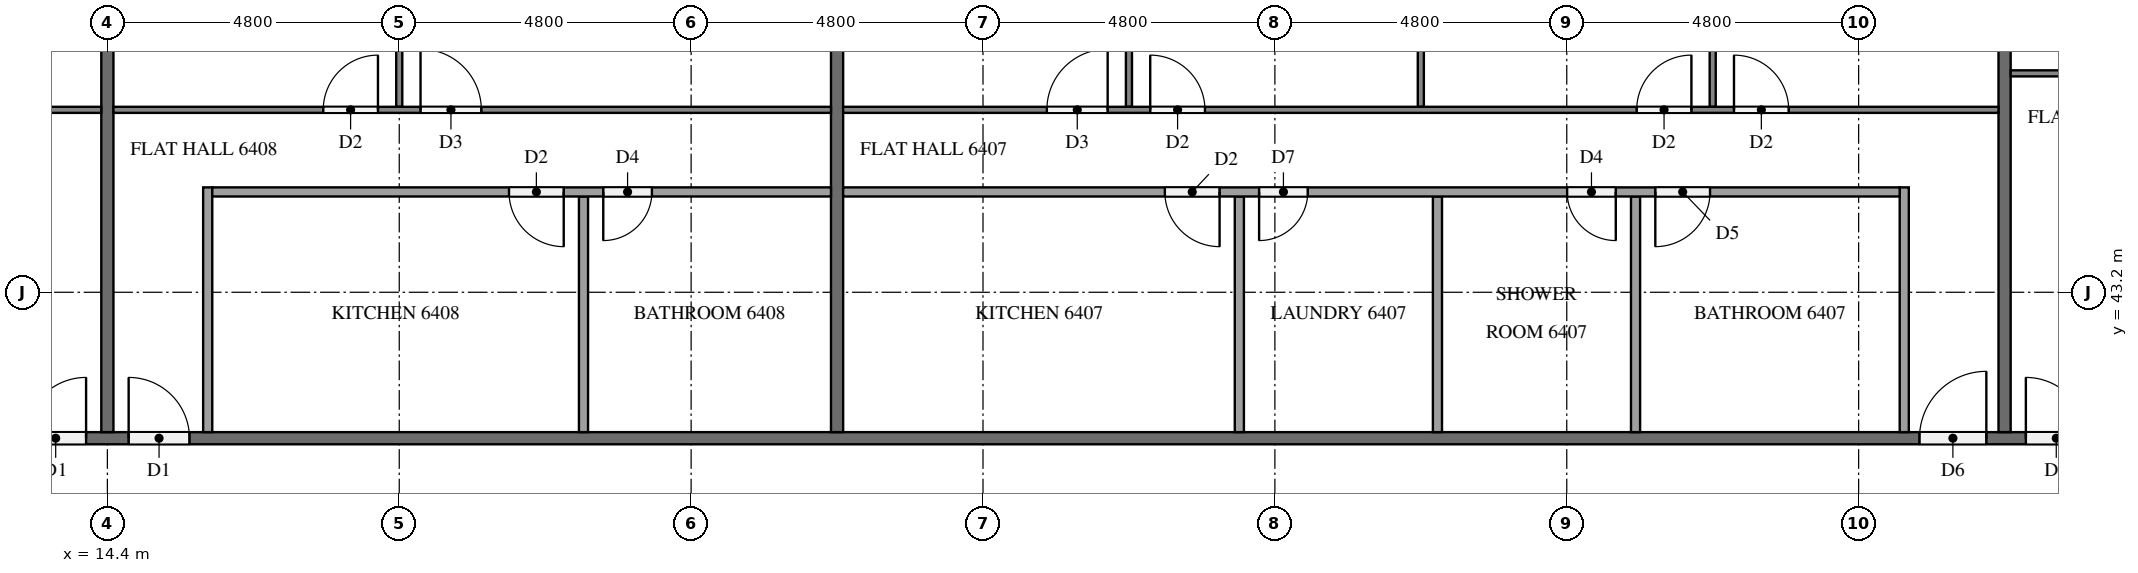
"""IFC4 building model, lengths in metres.
Left out: names, types, materials, properties, quantities, classifications, styles, units other than length and angle.
Written with IfcOpenShell. Run it as: python <this file> out.ifc"""

import sys

from ifc_helpers import new_model, si_unit, direction, frame, frame_2d, origin, place, context, subcontext, project, spatial, rectangle, extrude, element, fill, save


model = new_model("IFC4")
c1 = context("Model", 3, precision=1e-05, world=origin(), true_north=direction((0.0, 1.0)))
c2 = subcontext(c1, "Body", "Model", "MODEL_VIEW")
j1 = project(units=[si_unit("LENGTHUNIT", "METRE"), si_unit("PLANEANGLEUNIT", "RADIAN")], contexts=[c1])
p1 = place(None, origin())
s1 = spatial("IfcSite", under=j1, at=p1, CompositionType="ELEMENT")
p2 = place(p1, origin())
s2 = spatial("IfcBuilding", under=s1, at=p2, CompositionType="ELEMENT")
p3 = place(p2, frame((0.0, 0.0, 245.7)))
s3 = spatial("IfcBuildingStorey", under=s2, at=p3, CompositionType="ELEMENT", Elevation=245.7)
p4 = place(p3, frame((11.9, 40.8, 0.0), z_axis=(0.0, 0.0, 1.0), x_axis=(1.0, 0.0, 0.0)))
e1 = element("IfcWall", 1, at=p4, inside=s3, PredefinedType="PARTITIONING", context=c2, shape_type="SweptSolid", body=[
    extrude(rectangle(XDim=38.6, YDim=0.2, at=frame_2d((19.3, 0.0))), origin(), (0.0, 0.0, 1.0), 3.2),
])
p5 = place(p4, frame((34.05, 0.0, 0.0)))
e2 = element("IfcOpeningElement", 2, at=p5, cuts=e1, PredefinedType="OPENING", context=c2, shape_type="SweptSolid", body=[
    extrude(rectangle(XDim=1.0, YDim=2.1, at=frame_2d((0.5, 1.05))), frame((0.0, 0.11, 0.0), z_axis=(0.0, -1.0, 0.0), x_axis=(1.0, 0.0, 0.0)), (0.0, 0.0, 1.0), 0.22),
])
p6 = place(p4, frame((32.3, 0.0, 0.0)))
e3 = element("IfcOpeningElement", 3, at=p6, cuts=e1, PredefinedType="OPENING", context=c2, shape_type="SweptSolid", body=[
    extrude(rectangle(XDim=1.1, YDim=2.1, at=frame_2d((0.55, 1.05))), frame((0.0, 0.11, 0.0), z_axis=(0.0, -1.0, 0.0), x_axis=(1.0, 0.0, 0.0)), (0.0, 0.0, 1.0), 0.22),
])
p7 = place(p4, frame((2.85, 0.0, 0.0)))
e4 = element("IfcOpeningElement", 4, at=p7, cuts=e1, PredefinedType="OPENING", context=c2, shape_type="SweptSolid", body=[
    extrude(rectangle(XDim=1.0, YDim=2.1, at=frame_2d((0.5, 1.05))), frame((0.0, 0.11, 0.0), z_axis=(0.0, -1.0, 0.0), x_axis=(1.0, 0.0, 0.0)), (0.0, 0.0, 1.0), 0.22),
])
p8 = place(p4, frame((1.15, 0.0, 0.0)))
e5 = element("IfcOpeningElement", 5, at=p8, cuts=e1, PredefinedType="OPENING", context=c2, shape_type="SweptSolid", body=[
    extrude(rectangle(XDim=1.0, YDim=2.1, at=frame_2d((0.5, 1.05))), frame((0.0, 0.11, 0.0), z_axis=(0.0, -1.0, 0.0), x_axis=(1.0, 0.0, 0.0)), (0.0, 0.0, 1.0), 0.22),
])
for number, where, z_axis, x_axis in (
    (6, (45.6, 52.7, 0.0), (0.0, 0.0, 1.0), (0.0, -1.0, 0.0)),
    (7, (26.4, 52.7, 0.0), (0.0, 0.0, 1.0), (0.0, -1.0, 0.0)),
):
    element("IfcWall", number, at=place(p3, frame(where, z_axis=z_axis, x_axis=x_axis)), inside=s3, PredefinedType="PARTITIONING", context=c2, shape_type="SweptSolid", body=[
        extrude(rectangle(XDim=11.8, YDim=0.2, at=frame_2d((5.9, 0.0))), origin(), (0.0, 0.0, 1.0), 3.2),
    ])
p9 = place(p3, frame((14.4, 52.525, 0.0), z_axis=(0.0, 0.0, 1.0), x_axis=(0.0, -1.0, 0.0)))
e8 = element("IfcWall", 8, at=p9, inside=s3, PredefinedType="PARTITIONING", context=c2, shape_type="SweptSolid", body=[
    extrude(rectangle(XDim=11.625, YDim=0.2, at=frame_2d((5.812, 0.0))), origin(), (0.0, 0.0, 1.0), 3.2),
])
p10 = place(p3, frame((45.7, 46.8, 0.0), z_axis=(0.0, 0.0, 1.0), x_axis=(1.0, 0.0, 0.0)))
e9 = element("IfcWall", 9, at=p10, inside=s3, PredefinedType="PARTITIONING", context=c2, shape_type="SweptSolid", body=[
    extrude(rectangle(XDim=11.8, YDim=0.1, at=frame_2d((5.9, 0.0))), origin(), (0.0, 0.0, 1.0), 3.2),
])
p11 = place(p10, frame((3.45, 0.0, 0.0)))
e10 = element("IfcOpeningElement", 10, at=p11, cuts=e9, PredefinedType="OPENING", context=c2, shape_type="SweptSolid", body=[
    extrude(rectangle(XDim=0.9, YDim=2.1, at=frame_2d((0.45, 1.05))), frame((0.0, 0.06, 0.0), z_axis=(0.0, -1.0, 0.0), x_axis=(1.0, 0.0, 0.0)), (0.0, 0.0, 1.0), 0.12),
])
p12 = place(p10, frame((5.05, 0.0, 0.0)))
e11 = element("IfcOpeningElement", 11, at=p12, cuts=e9, PredefinedType="OPENING", context=c2, shape_type="SweptSolid", body=[
    extrude(rectangle(XDim=1.0, YDim=2.1, at=frame_2d((0.5, 1.05))), frame((0.0, 0.06, 0.0), z_axis=(0.0, -1.0, 0.0), x_axis=(1.0, 0.0, 0.0)), (0.0, 0.0, 1.0), 0.12),
])
for number, where, z_axis, x_axis in (
    (12, (40.8, 46.25, 0.0), (0.0, 0.0, 1.0), (0.0, 1.0, 0.0)),
    (13, (36.0, 46.25, 0.0), (0.0, 0.0, 1.0), (0.0, 1.0, 0.0)),
    (14, (31.2, 46.25, 0.0), (0.0, 0.0, 1.0), (0.0, 1.0, 0.0)),
):
    element("IfcWall", number, at=place(p3, frame(where, z_axis=z_axis, x_axis=x_axis)), inside=s3, PredefinedType="PARTITIONING", context=c2, shape_type="SweptSolid", body=[
        extrude(rectangle(XDim=6.45, YDim=0.1, at=frame_2d((3.225, 0.0))), origin(), (0.0, 0.0, 1.0), 3.2),
    ])
p13 = place(p3, frame((26.5, 46.2, 0.0), z_axis=(0.0, 0.0, 1.0), x_axis=(1.0, 0.0, 0.0)))
e15 = element("IfcWall", 15, at=p13, inside=s3, PredefinedType="PARTITIONING", context=c2, shape_type="SweptSolid", body=[
    extrude(rectangle(XDim=19.0, YDim=0.1, at=frame_2d((9.5, 0.0))), origin(), (0.0, 0.0, 1.0), 3.2),
])
p14 = place(p13, frame((14.65, 0.0, 0.0)))
e16 = element("IfcOpeningElement", 16, at=p14, cuts=e15, PredefinedType="OPENING", context=c2, shape_type="SweptSolid", body=[
    extrude(rectangle(XDim=0.9, YDim=2.1, at=frame_2d((0.45, 1.05))), frame((0.0, 0.06, 0.0), z_axis=(0.0, -1.0, 0.0), x_axis=(1.0, 0.0, 0.0)), (0.0, 0.0, 1.0), 0.12),
])
p15 = place(p13, frame((13.05, 0.0, 0.0)))
e17 = element("IfcOpeningElement", 17, at=p15, cuts=e15, PredefinedType="OPENING", context=c2, shape_type="SweptSolid", body=[
    extrude(rectangle(XDim=0.9, YDim=2.1, at=frame_2d((0.45, 1.05))), frame((0.0, 0.06, 0.0), z_axis=(0.0, -1.0, 0.0), x_axis=(1.0, 0.0, 0.0)), (0.0, 0.0, 1.0), 0.12),
])
p16 = place(p13, frame((5.05, 0.0, 0.0)))
e18 = element("IfcOpeningElement", 18, at=p16, cuts=e15, PredefinedType="OPENING", context=c2, shape_type="SweptSolid", body=[
    extrude(rectangle(XDim=0.9, YDim=2.1, at=frame_2d((0.45, 1.05))), frame((0.0, 0.06, 0.0), z_axis=(0.0, -1.0, 0.0), x_axis=(1.0, 0.0, 0.0)), (0.0, 0.0, 1.0), 0.12),
])
p17 = place(p13, frame((3.35, 0.0, 0.0)))
e19 = element("IfcOpeningElement", 19, at=p17, cuts=e15, PredefinedType="OPENING", context=c2, shape_type="SweptSolid", body=[
    extrude(rectangle(XDim=1.0, YDim=2.1, at=frame_2d((0.5, 1.05))), frame((0.0, 0.06, 0.0), z_axis=(0.0, -1.0, 0.0), x_axis=(1.0, 0.0, 0.0)), (0.0, 0.0, 1.0), 0.12),
])
for number, where, z_axis, x_axis in (
    (20, (39.531, 40.9, 0.0), (0.0, 0.0, 1.0), (0.0, 1.0, 0.0)),
    (21, (36.273, 40.9, 0.0), (0.0, 0.0, 1.0), (0.0, 1.0, 0.0)),
    (22, (33.016, 40.9, 0.0), (0.0, 0.0, 1.0), (0.0, 1.0, 0.0)),
):
    element("IfcWall", number, at=place(p3, frame(where, z_axis=z_axis, x_axis=x_axis)), inside=s3, PredefinedType="PARTITIONING", context=c2, shape_type="SweptSolid", body=[
        extrude(rectangle(XDim=3.875, YDim=0.15, at=frame_2d((1.938, 0.0))), origin(), (0.0, 0.0, 1.0), 3.2),
    ])
p18 = place(p3, frame((43.95, 40.9, 0.0), z_axis=(0.0, 0.0, 1.0), x_axis=(0.0, 1.0, 0.0)))
e23 = element("IfcWall", 23, at=p18, inside=s3, PredefinedType="PARTITIONING", context=c2, shape_type="SweptSolid", body=[
    extrude(rectangle(XDim=4.025, YDim=0.15, at=frame_2d((2.013, 0.0))), origin(), (0.0, 0.0, 1.0), 3.2),
])
p19 = place(p3, frame((43.875, 44.85, 0.0), z_axis=(0.0, 0.0, 1.0), x_axis=(-1.0, 0.0, 0.0)))
e24 = element("IfcWall", 24, at=p19, inside=s3, PredefinedType="PARTITIONING", context=c2, shape_type="SweptSolid", body=[
    extrude(rectangle(XDim=17.375, YDim=0.15, at=frame_2d((8.688, 0.0))), origin(), (0.0, 0.0, 1.0), 3.2),
])
p20 = place(p19, frame((3.119, 0.0, 0.0)))
e25 = element("IfcOpeningElement", 25, at=p20, cuts=e24, PredefinedType="OPENING", context=c2, shape_type="SweptSolid", body=[
    extrude(rectangle(XDim=0.9, YDim=2.1, at=frame_2d((0.45, 1.05))), frame((0.0, 0.085, 0.0), z_axis=(0.0, -1.0, 0.0), x_axis=(1.0, 0.0, 0.0)), (0.0, 0.0, 1.0), 0.17),
])
p21 = place(p19, frame((4.669, 0.0, 0.0)))
e26 = element("IfcOpeningElement", 26, at=p21, cuts=e24, PredefinedType="OPENING", context=c2, shape_type="SweptSolid", body=[
    extrude(rectangle(XDim=0.8, YDim=2.1, at=frame_2d((0.4, 1.05))), frame((0.0, 0.085, 0.0), z_axis=(0.0, -1.0, 0.0), x_axis=(1.0, 0.0, 0.0)), (0.0, 0.0, 1.0), 0.17),
])
p22 = place(p19, frame((9.734, 0.0, 0.0)))
e27 = element("IfcOpeningElement", 27, at=p22, cuts=e24, PredefinedType="OPENING", context=c2, shape_type="SweptSolid", body=[
    extrude(rectangle(XDim=0.8, YDim=2.1, at=frame_2d((0.4, 1.05))), frame((0.0, 0.085, 0.0), z_axis=(0.0, -1.0, 0.0), x_axis=(1.0, 0.0, 0.0)), (0.0, 0.0, 1.0), 0.17),
])
p23 = place(p19, frame((11.184, 0.0, 0.0)))
e28 = element("IfcOpeningElement", 28, at=p23, cuts=e24, PredefinedType="OPENING", context=c2, shape_type="SweptSolid", body=[
    extrude(rectangle(XDim=0.9, YDim=2.1, at=frame_2d((0.45, 1.05))), frame((0.0, 0.085, 0.0), z_axis=(0.0, -1.0, 0.0), x_axis=(1.0, 0.0, 0.0)), (0.0, 0.0, 1.0), 0.17),
])
p24 = place(p3, frame((19.2, 46.25, 0.0), z_axis=(0.0, 0.0, 1.0), x_axis=(0.0, 1.0, 0.0)))
e29 = element("IfcWall", 29, at=p24, inside=s3, PredefinedType="PARTITIONING", context=c2, shape_type="SweptSolid", body=[
    extrude(rectangle(XDim=6.45, YDim=0.1, at=frame_2d((3.225, 0.0))), origin(), (0.0, 0.0, 1.0), 3.2),
])
p25 = place(p3, frame((14.5, 46.2, 0.0), z_axis=(0.0, 0.0, 1.0), x_axis=(1.0, 0.0, 0.0)))
e30 = element("IfcWall", 30, at=p25, inside=s3, PredefinedType="PARTITIONING", context=c2, shape_type="SweptSolid", body=[
    extrude(rectangle(XDim=11.8, YDim=0.1, at=frame_2d((5.9, 0.0))), origin(), (0.0, 0.0, 1.0), 3.2),
])
p26 = place(p25, frame((3.45, 0.0, 0.0)))
e31 = element("IfcOpeningElement", 31, at=p26, cuts=e30, PredefinedType="OPENING", context=c2, shape_type="SweptSolid", body=[
    extrude(rectangle(XDim=0.9, YDim=2.1, at=frame_2d((0.45, 1.05))), frame((0.0, 0.06, 0.0), z_axis=(0.0, -1.0, 0.0), x_axis=(1.0, 0.0, 0.0)), (0.0, 0.0, 1.0), 0.12),
])
p27 = place(p25, frame((5.05, 0.0, 0.0)))
e32 = element("IfcOpeningElement", 32, at=p27, cuts=e30, PredefinedType="OPENING", context=c2, shape_type="SweptSolid", body=[
    extrude(rectangle(XDim=1.0, YDim=2.1, at=frame_2d((0.5, 1.05))), frame((0.0, 0.06, 0.0), z_axis=(0.0, -1.0, 0.0), x_axis=(1.0, 0.0, 0.0)), (0.0, 0.0, 1.0), 0.12),
])
p28 = place(p3, frame((22.23, 40.9, 0.0), z_axis=(0.0, 0.0, 1.0), x_axis=(0.0, 1.0, 0.0)))
e33 = element("IfcWall", 33, at=p28, inside=s3, PredefinedType="PARTITIONING", context=c2, shape_type="SweptSolid", body=[
    extrude(rectangle(XDim=3.875, YDim=0.15, at=frame_2d((1.938, 0.0))), origin(), (0.0, 0.0, 1.0), 3.2),
])
p29 = place(p3, frame((16.05, 40.9, 0.0), z_axis=(0.0, 0.0, 1.0), x_axis=(0.0, 1.0, 0.0)))
e34 = element("IfcWall", 34, at=p29, inside=s3, PredefinedType="PARTITIONING", context=c2, shape_type="SweptSolid", body=[
    extrude(rectangle(XDim=4.025, YDim=0.15, at=frame_2d((2.013, 0.0))), origin(), (0.0, 0.0, 1.0), 3.2),
])
p30 = place(p3, frame((26.3, 44.85, 0.0), z_axis=(0.0, 0.0, 1.0), x_axis=(-1.0, 0.0, 0.0)))
e35 = element("IfcWall", 35, at=p30, inside=s3, PredefinedType="PARTITIONING", context=c2, shape_type="SweptSolid", body=[
    extrude(rectangle(XDim=10.175, YDim=0.15, at=frame_2d((5.087, 0.0))), origin(), (0.0, 0.0, 1.0), 3.2),
])
p31 = place(p30, frame((4.395, 0.0, 0.0)))
e36 = element("IfcOpeningElement", 36, at=p31, cuts=e35, PredefinedType="OPENING", context=c2, shape_type="SweptSolid", body=[
    extrude(rectangle(XDim=0.9, YDim=2.1, at=frame_2d((0.45, 1.05))), frame((0.0, 0.085, 0.0), z_axis=(0.0, -1.0, 0.0), x_axis=(1.0, 0.0, 0.0)), (0.0, 0.0, 1.0), 0.17),
])
p32 = place(p30, frame((2.945, 0.0, 0.0)))
e37 = element("IfcOpeningElement", 37, at=p32, cuts=e35, PredefinedType="OPENING", context=c2, shape_type="SweptSolid", body=[
    extrude(rectangle(XDim=0.8, YDim=2.1, at=frame_2d((0.4, 1.05))), frame((0.0, 0.085, 0.0), z_axis=(0.0, -1.0, 0.0), x_axis=(1.0, 0.0, 0.0)), (0.0, 0.0, 1.0), 0.17),
])
p33 = place(p3, frame((0.1, 46.2, 0.0), z_axis=(0.0, 0.0, 1.0), x_axis=(1.0, 0.0, 0.0)))
e38 = element("IfcWall", 38, at=p33, inside=s3, PredefinedType="PARTITIONING", context=c2, shape_type="SweptSolid", body=[
    extrude(rectangle(XDim=14.2, YDim=0.1, at=frame_2d((7.1, 0.0))), origin(), (0.0, 0.0, 1.0), 3.2),
])
p34 = place(p33, frame((9.85, 0.0, 0.0)))
e39 = element("IfcOpeningElement", 39, at=p34, cuts=e38, PredefinedType="OPENING", context=c2, shape_type="SweptSolid", body=[
    extrude(rectangle(XDim=1.0, YDim=2.1, at=frame_2d((0.5, 1.05))), frame((0.0, 0.06, 0.0), z_axis=(0.0, -1.0, 0.0), x_axis=(1.0, 0.0, 0.0)), (0.0, 0.0, 1.0), 0.12),
])
p35 = place(p33, frame((8.25, 0.0, 0.0)))
e40 = element("IfcOpeningElement", 40, at=p35, cuts=e38, PredefinedType="OPENING", context=c2, shape_type="SweptSolid", body=[
    extrude(rectangle(XDim=0.9, YDim=2.1, at=frame_2d((0.45, 1.05))), frame((0.0, 0.06, 0.0), z_axis=(0.0, -1.0, 0.0), x_axis=(1.0, 0.0, 0.0)), (0.0, 0.0, 1.0), 0.12),
])
p36 = place(p33, frame((0.3, 0.0, 0.0)))
e41 = element("IfcOpeningElement", 41, at=p36, cuts=e38, PredefinedType="OPENING", context=c2, shape_type="SweptSolid", body=[
    extrude(rectangle(XDim=0.9, YDim=2.1, at=frame_2d((0.45, 1.05))), frame((0.0, 0.06, 0.0), z_axis=(0.0, -1.0, 0.0), x_axis=(1.0, 0.0, 0.0)), (0.0, 0.0, 1.0), 0.12),
])
p37 = place(p5, origin())
e42 = element("IfcDoor", 42, at=p37, inside=s3, OperationType="SINGLE_SWING_LEFT", PredefinedType="DOOR", context=c2, shape_type="SweptSolid", body=[
    extrude(rectangle(XDim=1.0, YDim=2.1, at=frame_2d((0.5, 1.05))), frame((0.0, 0.025, 0.0), z_axis=(0.0, -1.0, 0.0), x_axis=(1.0, 0.0, 0.0)), (0.0, 0.0, 1.0), 0.05),
])
fill(e2, e42)
p38 = place(p6, origin())
e43 = element("IfcDoor", 43, at=p38, inside=s3, OperationType="SINGLE_SWING_RIGHT", PredefinedType="DOOR", context=c2, shape_type="SweptSolid", body=[
    extrude(rectangle(XDim=1.1, YDim=2.1, at=frame_2d((0.55, 1.05))), frame((0.0, 0.025, 0.0), z_axis=(0.0, -1.0, 0.0), x_axis=(1.0, 0.0, 0.0)), (0.0, 0.0, 1.0), 0.05),
])
fill(e3, e43)
p39 = place(p7, origin())
e44 = element("IfcDoor", 44, at=p39, inside=s3, OperationType="SINGLE_SWING_LEFT", PredefinedType="DOOR", context=c2, shape_type="SweptSolid", body=[
    extrude(rectangle(XDim=1.0, YDim=2.1, at=frame_2d((0.5, 1.05))), frame((0.0, 0.025, 0.0), z_axis=(0.0, -1.0, 0.0), x_axis=(1.0, 0.0, 0.0)), (0.0, 0.0, 1.0), 0.05),
])
fill(e4, e44)
p40 = place(p8, origin())
e45 = element("IfcDoor", 45, at=p40, inside=s3, OperationType="SINGLE_SWING_RIGHT", PredefinedType="DOOR", context=c2, shape_type="SweptSolid", body=[
    extrude(rectangle(XDim=1.0, YDim=2.1, at=frame_2d((0.5, 1.05))), frame((0.0, 0.025, 0.0), z_axis=(0.0, -1.0, 0.0), x_axis=(1.0, 0.0, 0.0)), (0.0, 0.0, 1.0), 0.05),
])
fill(e5, e45)
p41 = place(p14, origin())
e46 = element("IfcDoor", 46, at=p41, inside=s3, OperationType="SINGLE_SWING_LEFT", PredefinedType="DOOR", context=c2, shape_type="SweptSolid", body=[
    extrude(rectangle(XDim=0.9, YDim=2.1, at=frame_2d((0.45, 1.05))), frame((0.0, 0.025, 0.0), z_axis=(0.0, -1.0, 0.0), x_axis=(1.0, 0.0, 0.0)), (0.0, 0.0, 1.0), 0.05),
])
fill(e16, e46)
p42 = place(p15, origin())
e47 = element("IfcDoor", 47, at=p42, inside=s3, OperationType="SINGLE_SWING_RIGHT", PredefinedType="DOOR", context=c2, shape_type="SweptSolid", body=[
    extrude(rectangle(XDim=0.9, YDim=2.1, at=frame_2d((0.45, 1.05))), frame((0.0, 0.025, 0.0), z_axis=(0.0, -1.0, 0.0), x_axis=(1.0, 0.0, 0.0)), (0.0, 0.0, 1.0), 0.05),
])
fill(e17, e47)
p43 = place(p16, origin())
e48 = element("IfcDoor", 48, at=p43, inside=s3, OperationType="SINGLE_SWING_LEFT", PredefinedType="DOOR", context=c2, shape_type="SweptSolid", body=[
    extrude(rectangle(XDim=0.9, YDim=2.1, at=frame_2d((0.45, 1.05))), frame((0.0, 0.025, 0.0), z_axis=(0.0, -1.0, 0.0), x_axis=(1.0, 0.0, 0.0)), (0.0, 0.0, 1.0), 0.05),
])
fill(e18, e48)
p44 = place(p17, origin())
e49 = element("IfcDoor", 49, at=p44, inside=s3, OperationType="SINGLE_SWING_RIGHT", PredefinedType="DOOR", context=c2, shape_type="SweptSolid", body=[
    extrude(rectangle(XDim=1.0, YDim=2.1, at=frame_2d((0.5, 1.05))), frame((0.0, 0.025, 0.0), z_axis=(0.0, -1.0, 0.0), x_axis=(1.0, 0.0, 0.0)), (0.0, 0.0, 1.0), 0.05),
])
fill(e19, e49)
p45 = place(p20, origin())
e50 = element("IfcDoor", 50, at=p45, inside=s3, OperationType="SINGLE_SWING_RIGHT", PredefinedType="DOOR", context=c2, shape_type="SweptSolid", body=[
    extrude(rectangle(XDim=0.9, YDim=2.1, at=frame_2d((0.45, 1.05))), frame((0.0, 0.025, 0.0), z_axis=(0.0, -1.0, 0.0), x_axis=(1.0, 0.0, 0.0)), (0.0, 0.0, 1.0), 0.05),
])
fill(e25, e50)
p46 = place(p21, origin())
e51 = element("IfcDoor", 51, at=p46, inside=s3, OperationType="SINGLE_SWING_LEFT", PredefinedType="DOOR", context=c2, shape_type="SweptSolid", body=[
    extrude(rectangle(XDim=0.8, YDim=2.1, at=frame_2d((0.4, 1.05))), frame((0.0, 0.025, 0.0), z_axis=(0.0, -1.0, 0.0), x_axis=(1.0, 0.0, 0.0)), (0.0, 0.0, 1.0), 0.05),
])
fill(e26, e51)
p47 = place(p22, origin())
e52 = element("IfcDoor", 52, at=p47, inside=s3, OperationType="SINGLE_SWING_RIGHT", PredefinedType="DOOR", context=c2, shape_type="SweptSolid", body=[
    extrude(rectangle(XDim=0.8, YDim=2.1, at=frame_2d((0.4, 1.05))), frame((0.0, 0.025, 0.0), z_axis=(0.0, -1.0, 0.0), x_axis=(1.0, 0.0, 0.0)), (0.0, 0.0, 1.0), 0.05),
])
fill(e27, e52)
p48 = place(p23, origin())
e53 = element("IfcDoor", 53, at=p48, inside=s3, OperationType="SINGLE_SWING_LEFT", PredefinedType="DOOR", context=c2, shape_type="SweptSolid", body=[
    extrude(rectangle(XDim=0.9, YDim=2.1, at=frame_2d((0.45, 1.05))), frame((0.0, 0.025, 0.0), z_axis=(0.0, -1.0, 0.0), x_axis=(1.0, 0.0, 0.0)), (0.0, 0.0, 1.0), 0.05),
])
fill(e28, e53)
p49 = place(p26, origin())
e54 = element("IfcDoor", 54, at=p49, inside=s3, OperationType="SINGLE_SWING_RIGHT", PredefinedType="DOOR", context=c2, shape_type="SweptSolid", body=[
    extrude(rectangle(XDim=0.9, YDim=2.1, at=frame_2d((0.45, 1.05))), frame((0.0, 0.025, 0.0), z_axis=(0.0, -1.0, 0.0), x_axis=(1.0, 0.0, 0.0)), (0.0, 0.0, 1.0), 0.05),
])
fill(e31, e54)
p50 = place(p27, origin())
e55 = element("IfcDoor", 55, at=p50, inside=s3, OperationType="SINGLE_SWING_LEFT", PredefinedType="DOOR", context=c2, shape_type="SweptSolid", body=[
    extrude(rectangle(XDim=1.0, YDim=2.1, at=frame_2d((0.5, 1.05))), frame((0.0, 0.025, 0.0), z_axis=(0.0, -1.0, 0.0), x_axis=(1.0, 0.0, 0.0)), (0.0, 0.0, 1.0), 0.05),
])
fill(e32, e55)
p51 = place(p31, origin())
e56 = element("IfcDoor", 56, at=p51, inside=s3, OperationType="SINGLE_SWING_LEFT", PredefinedType="DOOR", context=c2, shape_type="SweptSolid", body=[
    extrude(rectangle(XDim=0.9, YDim=2.1, at=frame_2d((0.45, 1.05))), frame((0.0, 0.025, 0.0), z_axis=(0.0, -1.0, 0.0), x_axis=(1.0, 0.0, 0.0)), (0.0, 0.0, 1.0), 0.05),
])
fill(e36, e56)
p52 = place(p32, origin())
e57 = element("IfcDoor", 57, at=p52, inside=s3, OperationType="SINGLE_SWING_RIGHT", PredefinedType="DOOR", context=c2, shape_type="SweptSolid", body=[
    extrude(rectangle(XDim=0.8, YDim=2.1, at=frame_2d((0.4, 1.05))), frame((0.0, 0.025, 0.0), z_axis=(0.0, -1.0, 0.0), x_axis=(1.0, 0.0, 0.0)), (0.0, 0.0, 1.0), 0.05),
])
fill(e37, e57)
save(model, sys.argv[1])
